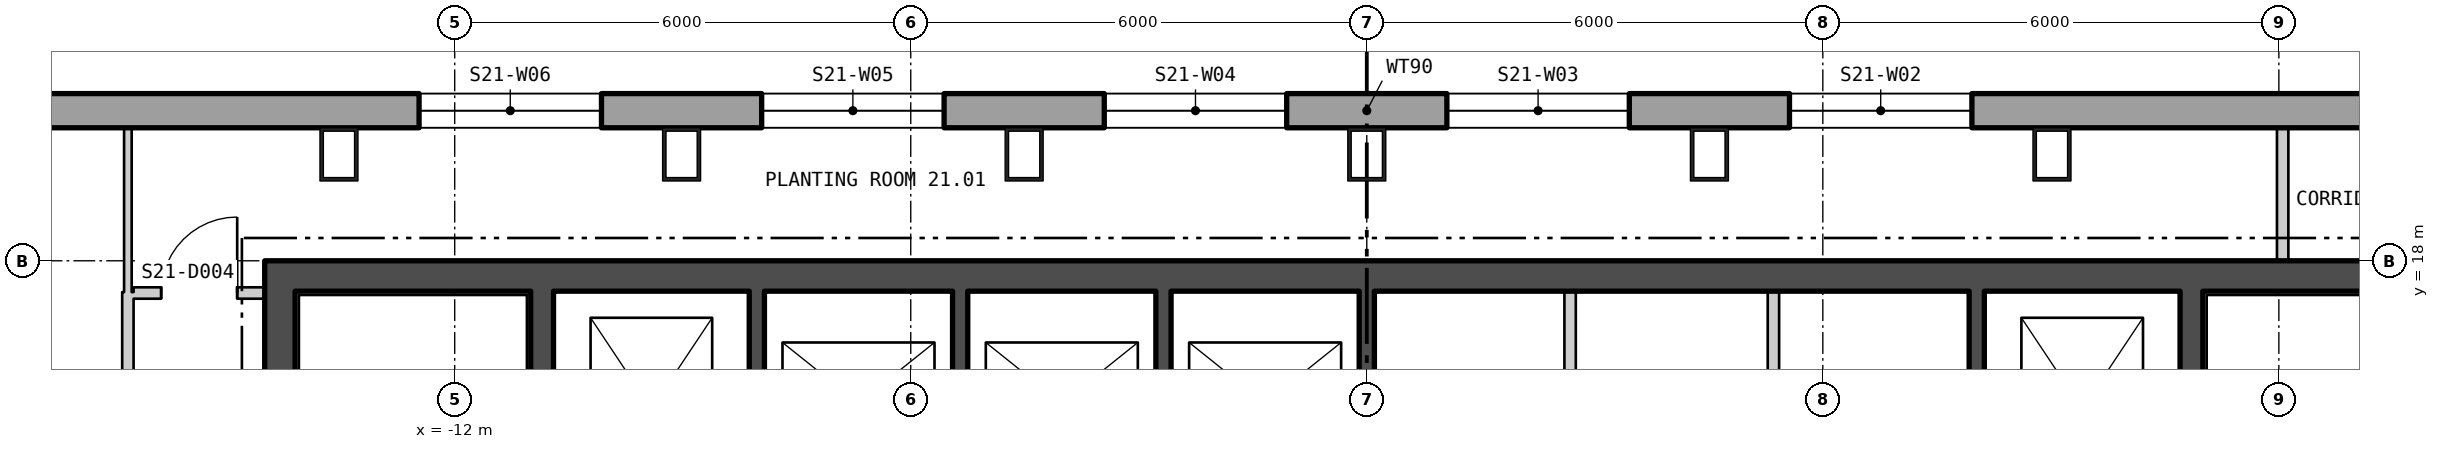
"""IFC4 building model, lengths in metres.
Left out: names, types, materials, properties, quantities, classifications, styles, units other than length and angle.
Written with IfcOpenShell. Run it as: python <this file> out.ifc"""

import sys

from ifc_helpers import new_model, si_unit, direction, frame, frame_2d, origin, origin_2d, place, context, subcontext, project, spatial, polyline, rectangle, hollow_rectangle, outline, extrude, element, fill, save


model = new_model("IFC4")
c1 = context("Model", 3, precision=1e-05, world=origin(), true_north=direction((0.0, 1.0)))
c2 = subcontext(c1, "Body", "Model", "MODEL_VIEW")
j1 = project(units=[si_unit("LENGTHUNIT", "METRE"), si_unit("PLANEANGLEUNIT", "RADIAN")], contexts=[c1])
p1 = place(None, origin())
s1 = spatial("IfcSite", under=j1, at=p1, CompositionType="ELEMENT")
p2 = place(p1, origin())
s2 = spatial("IfcBuilding", under=s1, at=p2, CompositionType="ELEMENT")
p3 = place(p2, frame((0.0, 0.0, 280.5)))
s3 = spatial("IfcBuildingStorey", under=s2, at=p3, CompositionType="ELEMENT", Elevation=280.5)
for number, where, z_axis, x_axis in (
    (1, (9.015, 19.4, 0.0), (0.0, 0.0, 1.0), (-1.0, 0.0, 0.0)),
    (2, (4.508, 19.4, 0.0), (0.0, 0.0, 1.0), (-1.0, 0.0, 0.0)),
    (3, (0.0, 19.4, 0.0), (0.0, 0.0, 1.0), (-1.0, 0.0, 0.0)),
    (4, (-4.508, 19.4, 0.0), (0.0, 0.0, 1.0), (-1.0, 0.0, 0.0)),
    (5, (-9.015, 19.4, 0.0), (0.0, 0.0, 1.0), (-1.0, 0.0, 0.0)),
    (6, (-13.523, 19.4, 0.0), (0.0, 0.0, 1.0), (-1.0, 0.0, 0.0)),
):
    element("IfcColumn", number, at=place(p3, frame(where, z_axis=z_axis, x_axis=x_axis)), inside=s3, PredefinedType="COLUMN", context=c2, shape_type="SweptSolid", body=[
        extrude(hollow_rectangle(XDim=0.5, YDim=0.7, WallThickness=0.045, at=origin_2d()), origin(), (0.0, 0.0, 1.0), 3.9),
    ])
p4 = place(p3, frame((22.87, 19.975, -0.4), z_axis=(0.0, 0.0, 1.0), x_axis=(-1.0, 0.0, 0.0)))
e7 = element("IfcWall", 7, at=p4, inside=s3, PredefinedType="SOLIDWALL", context=c2, shape_type="SweptSolid", body=[
    extrude(outline(polyline([(-0.13, -0.225), (45.87, -0.225), (45.61, 0.225), (0.13, 0.225), (-0.13, -0.225)])), origin(), (0.0, 0.0, 1.0), 3.9),
])
p5 = place(p4, frame((1.424, 0.0, 1.3)))
e8 = element("IfcOpeningElement", 8, at=p5, cuts=e7, PredefinedType="OPENING", context=c2, shape_type="SweptSolid", body=[
    extrude(rectangle(XDim=2.4, YDim=2.0, at=frame_2d((1.2, 1.0))), frame((0.0, 0.235, 0.0), z_axis=(0.0, -1.0, 0.0), x_axis=(1.0, 0.0, 0.0)), (0.0, 0.0, 1.0), 0.47),
])
p6 = place(p4, frame((14.909, 0.0, 1.3)))
e9 = element("IfcOpeningElement", 9, at=p6, cuts=e7, PredefinedType="OPENING", context=c2, shape_type="SweptSolid", body=[
    extrude(rectangle(XDim=2.4, YDim=2.0, at=frame_2d((1.2, 1.0))), frame((0.0, 0.235, 0.0), z_axis=(0.0, -1.0, 0.0), x_axis=(1.0, 0.0, 0.0)), (0.0, 0.0, 1.0), 0.47),
])
p7 = place(p4, frame((19.416, 0.0, 1.3)))
e10 = element("IfcOpeningElement", 10, at=p7, cuts=e7, PredefinedType="OPENING", context=c2, shape_type="SweptSolid", body=[
    extrude(rectangle(XDim=2.4, YDim=2.0, at=frame_2d((1.2, 1.0))), frame((0.0, 0.235, 0.0), z_axis=(0.0, -1.0, 0.0), x_axis=(1.0, 0.0, 0.0)), (0.0, 0.0, 1.0), 0.47),
])
p8 = place(p4, frame((23.924, 0.0, 1.3)))
e11 = element("IfcOpeningElement", 11, at=p8, cuts=e7, PredefinedType="OPENING", context=c2, shape_type="SweptSolid", body=[
    extrude(rectangle(XDim=2.4, YDim=2.0, at=frame_2d((1.2, 1.0))), frame((0.0, 0.235, 0.0), z_axis=(0.0, -1.0, 0.0), x_axis=(1.0, 0.0, 0.0)), (0.0, 0.0, 1.0), 0.47),
])
p9 = place(p4, frame((28.431, 0.0, 1.3)))
e12 = element("IfcOpeningElement", 12, at=p9, cuts=e7, PredefinedType="OPENING", context=c2, shape_type="SweptSolid", body=[
    extrude(rectangle(XDim=2.4, YDim=2.0, at=frame_2d((1.2, 1.0))), frame((0.0, 0.235, 0.0), z_axis=(0.0, -1.0, 0.0), x_axis=(1.0, 0.0, 0.0)), (0.0, 0.0, 1.0), 0.47),
])
p10 = place(p4, frame((32.939, 0.0, 1.3)))
e13 = element("IfcOpeningElement", 13, at=p10, cuts=e7, PredefinedType="OPENING", context=c2, shape_type="SweptSolid", body=[
    extrude(rectangle(XDim=2.4, YDim=2.0, at=frame_2d((1.2, 1.0))), frame((0.0, 0.235, 0.0), z_axis=(0.0, -1.0, 0.0), x_axis=(1.0, 0.0, 0.0)), (0.0, 0.0, 1.0), 0.47),
])
p11 = place(p4, frame((41.916, 0.0, 1.3)))
e14 = element("IfcOpeningElement", 14, at=p11, cuts=e7, PredefinedType="OPENING", context=c2, shape_type="SweptSolid", body=[
    extrude(rectangle(XDim=2.4, YDim=2.0, at=frame_2d((1.2, 1.0))), frame((0.0, 0.235, 0.0), z_axis=(0.0, -1.0, 0.0), x_axis=(1.0, 0.0, 0.0)), (0.0, 0.0, 1.0), 0.47),
])
p12 = place(p3, frame((-14.5, 17.8, 0.0), z_axis=(0.0, 0.0, 1.0), x_axis=(1.0, 0.0, 0.0)))
e15 = element("IfcWall", 15, at=p12, inside=s3, PredefinedType="SHEAR", context=c2, shape_type="SweptSolid", body=[
    extrude(rectangle(XDim=29.0, YDim=0.4, at=frame_2d((14.5, 0.0))), origin(), (0.0, 0.0, 1.0), 3.7),
])
p13 = place(p3, frame((-14.3, 4.4, 0.0), z_axis=(0.0, 0.0, 1.0), x_axis=(0.0, 1.0, 0.0)))
e16 = element("IfcWall", 16, at=p13, inside=s3, PredefinedType="SHEAR", context=c2, shape_type="SweptSolid", body=[
    extrude(rectangle(XDim=13.2, YDim=0.4, at=frame_2d((6.6, 0.0))), origin(), (0.0, 0.0, 1.0), 3.7),
])
p14 = place(p13, frame((3.05, 0.0, 0.0)))
e17 = element("IfcOpeningElement", 17, at=p14, cuts=e16, PredefinedType="OPENING", context=c2, shape_type="SweptSolid", body=[
    extrude(rectangle(XDim=1.5, YDim=2.1, at=frame_2d((0.75, 1.05))), frame((0.0, 0.21, 0.0), z_axis=(0.0, -1.0, 0.0), x_axis=(1.0, 0.0, 0.0)), (0.0, 0.0, 1.0), 0.42),
])
p15 = place(p3, frame((-10.85, 4.4, 0.0), z_axis=(0.0, 0.0, 1.0), x_axis=(0.0, 1.0, 0.0)))
e18 = element("IfcWall", 18, at=p15, inside=s3, PredefinedType="SHEAR", context=c2, shape_type="SweptSolid", body=[
    extrude(rectangle(XDim=13.2, YDim=0.3, at=frame_2d((6.6, 0.0))), origin(), (0.0, 0.0, 1.0), 3.7),
])
p16 = place(p15, frame((1.575, 0.0, 0.0)))
e19 = element("IfcOpeningElement", 19, at=p16, cuts=e18, PredefinedType="OPENING", context=c2, shape_type="SweptSolid", body=[
    extrude(rectangle(XDim=1.25, YDim=2.1, at=frame_2d((0.625, 1.05))), frame((0.0, 0.16, 0.0), z_axis=(0.0, -1.0, 0.0), x_axis=(1.0, 0.0, 0.0)), (0.0, 0.0, 1.0), 0.32),
])
p17 = place(p15, frame((0.4, 0.0, 0.0)))
e20 = element("IfcOpeningElement", 20, at=p17, cuts=e18, PredefinedType="OPENING", context=c2, shape_type="SweptSolid", body=[
    extrude(rectangle(XDim=0.9, YDim=2.1, at=frame_2d((0.45, 1.05))), frame((0.0, 0.16, 0.0), z_axis=(0.0, -1.0, 0.0), x_axis=(1.0, 0.0, 0.0)), (0.0, 0.0, 1.0), 0.32),
])
p18 = place(p3, frame((10.85, 4.4, 0.0), z_axis=(0.0, 0.0, 1.0), x_axis=(0.0, 1.0, 0.0)))
e21 = element("IfcWall", 21, at=p18, inside=s3, PredefinedType="SHEAR", context=c2, shape_type="SweptSolid", body=[
    extrude(rectangle(XDim=13.2, YDim=0.3, at=frame_2d((6.6, 0.0))), origin(), (0.0, 0.0, 1.0), 3.7),
])
p19 = place(p18, frame((1.575, 0.0, 0.0)))
e22 = element("IfcOpeningElement", 22, at=p19, cuts=e21, PredefinedType="OPENING", context=c2, shape_type="SweptSolid", body=[
    extrude(rectangle(XDim=1.25, YDim=2.1, at=frame_2d((0.625, 1.05))), frame((0.0, 0.16, 0.0), z_axis=(0.0, -1.0, 0.0), x_axis=(1.0, 0.0, 0.0)), (0.0, 0.0, 1.0), 0.32),
])
p20 = place(p18, frame((0.4, 0.0, 0.0)))
e23 = element("IfcOpeningElement", 23, at=p20, cuts=e21, PredefinedType="OPENING", context=c2, shape_type="SweptSolid", body=[
    extrude(rectangle(XDim=0.9, YDim=2.1, at=frame_2d((0.45, 1.05))), frame((0.0, 0.16, 0.0), z_axis=(0.0, -1.0, 0.0), x_axis=(1.0, 0.0, 0.0)), (0.0, 0.0, 1.0), 0.32),
])
for number, where, z_axis, x_axis in (
    (24, (-8.025, 14.7, 0.0), (0.0, 0.0, 1.0), (0.0, 1.0, 0.0)),
    (25, (-5.35, 14.7, 0.0), (0.0, 0.0, 1.0), (0.0, 1.0, 0.0)),
    (26, (-2.675, 14.7, 0.0), (0.0, 0.0, 1.0), (0.0, 1.0, 0.0)),
    (27, (0.0, 14.7, 0.0), (0.0, 0.0, 1.0), (0.0, 1.0, 0.0)),
):
    element("IfcWall", number, at=place(p3, frame(where, z_axis=z_axis, x_axis=x_axis)), inside=s3, PredefinedType="SHEAR", context=c2, shape_type="SweptSolid", body=[
        extrude(rectangle(XDim=2.9, YDim=0.2, at=frame_2d((1.45, 0.0))), origin(), (0.0, 0.0, 1.0), 3.7),
    ])
for number, where, z_axis, x_axis in (
    (28, (2.675, 14.7, 0.0), (0.0, 0.0, 1.0), (0.0, 1.0, 0.0)),
    (29, (5.35, 14.7, 0.0), (0.0, 0.0, 1.0), (0.0, 1.0, 0.0)),
):
    element("IfcWall", number, at=place(p3, frame(where, z_axis=z_axis, x_axis=x_axis)), inside=s3, PredefinedType="PARTITIONING", context=c2, shape_type="SweptSolid", body=[
        extrude(rectangle(XDim=2.9, YDim=0.15, at=frame_2d((1.45, 0.0))), origin(), (0.0, 0.0, 1.0), 3.7),
    ])
p21 = place(p3, frame((8.025, 14.7, 0.0), z_axis=(0.0, 0.0, 1.0), x_axis=(0.0, 1.0, 0.0)))
e30 = element("IfcWall", 30, at=p21, inside=s3, PredefinedType="SHEAR", context=c2, shape_type="SweptSolid", body=[
    extrude(rectangle(XDim=2.9, YDim=0.2, at=frame_2d((1.45, 0.0))), origin(), (0.0, 0.0, 1.0), 3.7),
])
p22 = place(p3, frame((-16.3, 2.125, 0.0), z_axis=(0.0, 0.0, 1.0), x_axis=(0.0, 1.0, 0.0)))
e31 = element("IfcWall", 31, at=p22, inside=s3, PredefinedType="PARTITIONING", context=c2, shape_type="SweptSolid", body=[
    extrude(rectangle(XDim=15.463, YDim=0.15, at=frame_2d((7.731, 0.0))), origin(), (0.0, 0.0, 1.0), 3.7),
])
p23 = place(p22, frame((3.385, 0.0, 0.0)))
e32 = element("IfcOpeningElement", 32, at=p23, cuts=e31, PredefinedType="OPENING", context=c2, shape_type="SweptSolid", body=[
    extrude(rectangle(XDim=1.0, YDim=2.1, at=frame_2d((0.5, 1.05))), frame((0.0, 0.085, 0.0), z_axis=(0.0, -1.0, 0.0), x_axis=(1.0, 0.0, 0.0)), (0.0, 0.0, 1.0), 0.17),
])
p24 = place(p22, frame((9.05, 0.0, 0.0)))
e33 = element("IfcOpeningElement", 33, at=p24, cuts=e31, PredefinedType="OPENING", context=c2, shape_type="SweptSolid", body=[
    extrude(rectangle(XDim=1.0, YDim=2.1, at=frame_2d((0.5, 1.05))), frame((0.0, 0.085, 0.0), z_axis=(0.0, -1.0, 0.0), x_axis=(1.0, 0.0, 0.0)), (0.0, 0.0, 1.0), 0.17),
])
p25 = place(p22, frame((12.758, 0.0, 0.0)))
e34 = element("IfcOpeningElement", 34, at=p25, cuts=e31, PredefinedType="OPENING", context=c2, shape_type="SweptSolid", body=[
    extrude(rectangle(XDim=1.0, YDim=2.1, at=frame_2d((0.5, 1.05))), frame((0.0, 0.085, 0.0), z_axis=(0.0, -1.0, 0.0), x_axis=(1.0, 0.0, 0.0)), (0.0, 0.0, 1.0), 0.17),
])
p26 = place(p3, frame((-16.3, 17.588, 0.0), z_axis=(0.0, 0.0, 1.0), x_axis=(0.0, 1.0, 0.0)))
e35 = element("IfcWall", 35, at=p26, inside=s3, PredefinedType="PARTITIONING", context=c2, shape_type="SweptSolid", body=[
    extrude(rectangle(XDim=2.162, YDim=0.1, at=frame_2d((1.081, 0.0))), origin(), (0.0, 0.0, 1.0), 3.7),
])
p27 = place(p3, frame((-16.225, 17.576, 0.0), z_axis=(0.0, 0.0, 1.0), x_axis=(1.0, 0.0, 0.0)))
e36 = element("IfcWall", 36, at=p27, inside=s3, PredefinedType="PARTITIONING", context=c2, shape_type="SweptSolid", body=[
    extrude(rectangle(XDim=1.725, YDim=0.15, at=frame_2d((0.863, 0.0))), origin(), (0.0, 0.0, 1.0), 3.7),
])
p28 = place(p27, frame((0.363, 0.0, 0.0)))
e37 = element("IfcOpeningElement", 37, at=p28, cuts=e36, PredefinedType="OPENING", context=c2, shape_type="SweptSolid", body=[
    extrude(rectangle(XDim=1.0, YDim=2.1, at=frame_2d((0.5, 1.05))), frame((0.0, 0.085, 0.0), z_axis=(0.0, -1.0, 0.0), x_axis=(1.0, 0.0, 0.0)), (0.0, 0.0, 1.0), 0.17),
])
p29 = place(p3, frame((12.05, 18.0, 0.0), z_axis=(0.0, 0.0, 1.0), x_axis=(0.0, 1.0, 0.0)))
e38 = element("IfcWall", 38, at=p29, inside=s3, PredefinedType="PARTITIONING", context=c2, shape_type="SweptSolid", body=[
    extrude(rectangle(XDim=1.75, YDim=0.15, at=frame_2d((0.875, 0.0))), origin(), (0.0, 0.0, 1.0), 3.7),
])
p30 = place(p6, origin())
e39 = element("IfcWindow", 39, at=p30, inside=s3, PartitioningType="SINGLE_PANEL", PredefinedType="WINDOW", context=c2, shape_type="SweptSolid", body=[
    extrude(rectangle(XDim=2.4, YDim=2.0, at=frame_2d((1.2, 1.0))), frame((0.0, 0.105, 0.0), z_axis=(0.0, -1.0, 0.0), x_axis=(1.0, 0.0, 0.0)), (0.0, 0.0, 1.0), 0.06),
])
fill(e9, e39)
p31 = place(p7, origin())
e40 = element("IfcWindow", 40, at=p31, inside=s3, PartitioningType="SINGLE_PANEL", PredefinedType="WINDOW", context=c2, shape_type="SweptSolid", body=[
    extrude(rectangle(XDim=2.4, YDim=2.0, at=frame_2d((1.2, 1.0))), frame((0.0, 0.105, 0.0), z_axis=(0.0, -1.0, 0.0), x_axis=(1.0, 0.0, 0.0)), (0.0, 0.0, 1.0), 0.06),
])
fill(e10, e40)
p32 = place(p8, origin())
e41 = element("IfcWindow", 41, at=p32, inside=s3, PartitioningType="SINGLE_PANEL", PredefinedType="WINDOW", context=c2, shape_type="SweptSolid", body=[
    extrude(rectangle(XDim=2.4, YDim=2.0, at=frame_2d((1.2, 1.0))), frame((0.0, 0.105, 0.0), z_axis=(0.0, -1.0, 0.0), x_axis=(1.0, 0.0, 0.0)), (0.0, 0.0, 1.0), 0.06),
])
fill(e11, e41)
p33 = place(p9, origin())
e42 = element("IfcWindow", 42, at=p33, inside=s3, PartitioningType="SINGLE_PANEL", PredefinedType="WINDOW", context=c2, shape_type="SweptSolid", body=[
    extrude(rectangle(XDim=2.4, YDim=2.0, at=frame_2d((1.2, 1.0))), frame((0.0, 0.105, 0.0), z_axis=(0.0, -1.0, 0.0), x_axis=(1.0, 0.0, 0.0)), (0.0, 0.0, 1.0), 0.06),
])
fill(e12, e42)
p34 = place(p10, origin())
e43 = element("IfcWindow", 43, at=p34, inside=s3, PartitioningType="SINGLE_PANEL", PredefinedType="WINDOW", context=c2, shape_type="SweptSolid", body=[
    extrude(rectangle(XDim=2.4, YDim=2.0, at=frame_2d((1.2, 1.0))), frame((0.0, 0.105, 0.0), z_axis=(0.0, -1.0, 0.0), x_axis=(1.0, 0.0, 0.0)), (0.0, 0.0, 1.0), 0.06),
])
fill(e13, e43)
p35 = place(p28, origin())
e44 = element("IfcDoor", 44, at=p35, inside=s3, OperationType="SINGLE_SWING_LEFT", PredefinedType="DOOR", context=c2, shape_type="SweptSolid", body=[
    extrude(rectangle(XDim=1.0, YDim=2.1, at=frame_2d((0.5, 1.05))), frame((0.0, 0.025, 0.0), z_axis=(0.0, -1.0, 0.0), x_axis=(1.0, 0.0, 0.0)), (0.0, 0.0, 1.0), 0.05),
])
fill(e37, e44)
save(model, sys.argv[1])
